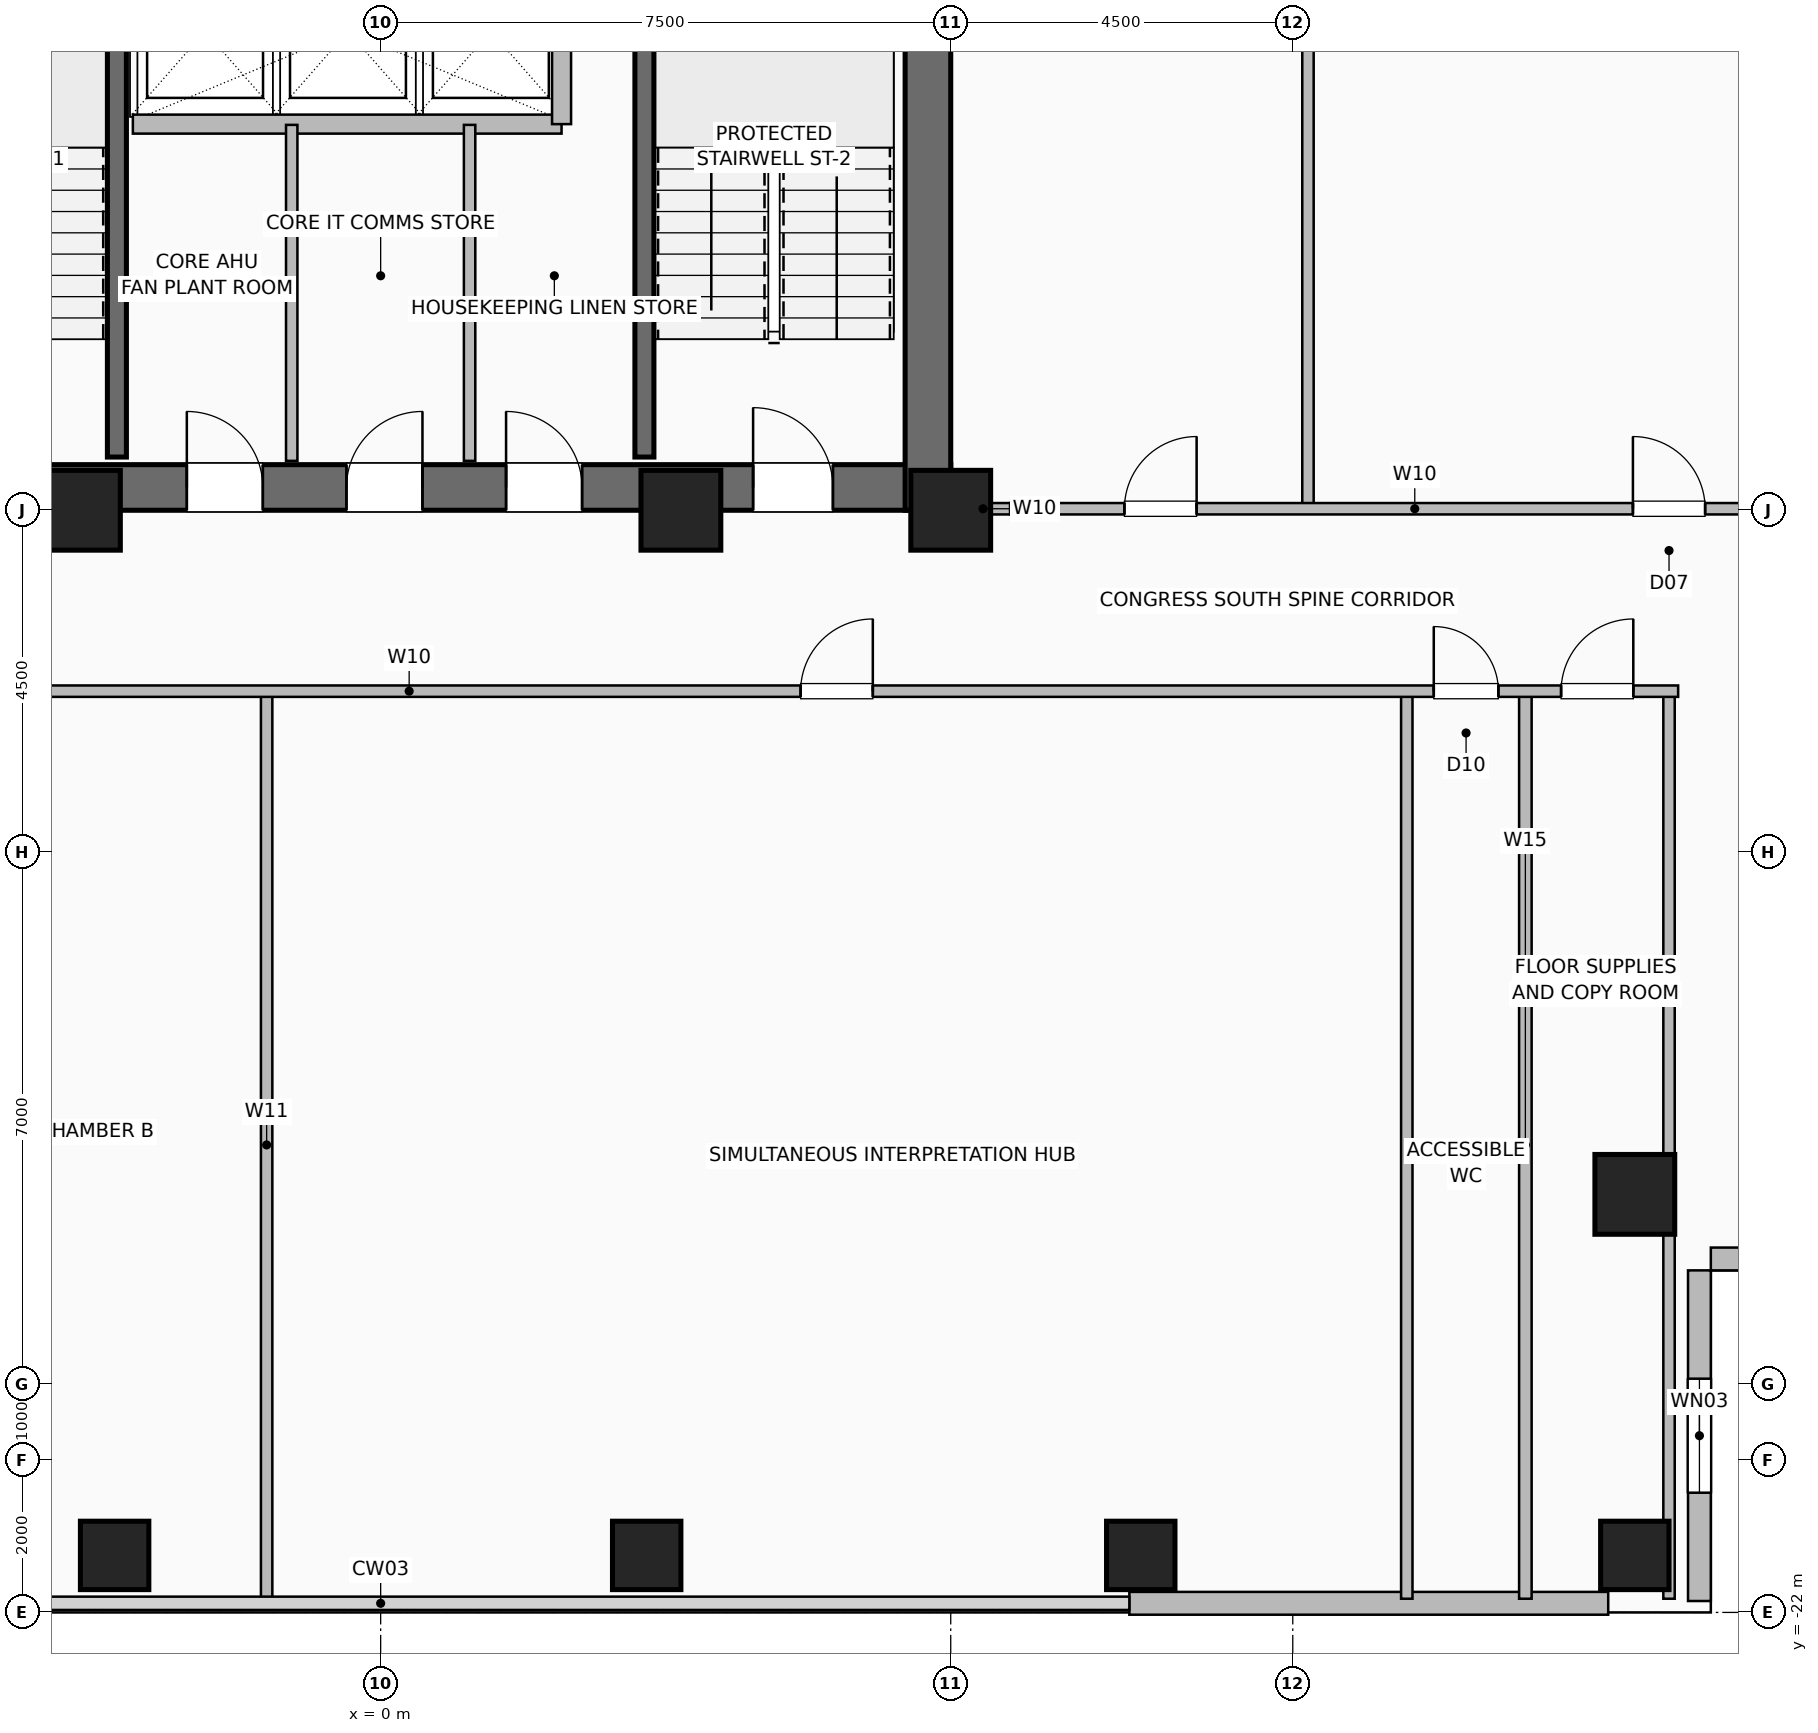
"""IFC4 building model, lengths in metres.
Left out: names, types, materials, properties, quantities, classifications, styles, units other than length and angle.
Written with IfcOpenShell. Run it as: python <this file> out.ifc"""

import sys

from ifc_helpers import new_model, si_unit, direction, frame, frame_2d, origin, origin_2d, place, context, subcontext, project, spatial, rectangle, hollow_rectangle, extrude, element, fill, save


model = new_model("IFC4")
c1 = context("Model", 3, precision=1e-05, world=origin(), true_north=direction((0.0, 1.0)))
c2 = subcontext(c1, "Body", "Model", "MODEL_VIEW")
j1 = project(units=[si_unit("LENGTHUNIT", "METRE"), si_unit("PLANEANGLEUNIT", "RADIAN")], contexts=[c1])
p1 = place(None, origin())
s1 = spatial("IfcSite", under=j1, at=p1, CompositionType="ELEMENT")
p2 = place(p1, origin())
s2 = spatial("IfcBuilding", under=s1, at=p2, CompositionType="ELEMENT")
p3 = place(p2, frame((0.0, 0.0, 101.2)))
s3 = spatial("IfcBuildingStorey", under=s2, at=p3, CompositionType="ELEMENT", Elevation=101.2)
for number, where, z_axis, x_axis in (
    (1, (-3.95, -7.5, 0.0), (0.0, 0.0, 1.0), (1.0, 0.0, 0.0)),
    (2, (3.95, -7.5, 0.0), (0.0, 0.0, 1.0), (1.0, 0.0, 0.0)),
    (3, (7.5, -7.5, 0.0), (0.0, 0.0, 1.0), (1.0, 0.0, 0.0)),
):
    element("IfcColumn", number, at=place(p3, frame(where, z_axis=z_axis, x_axis=x_axis)), inside=s3, PredefinedType="COLUMN", context=c2, shape_type="SweptSolid", body=[
        extrude(hollow_rectangle(XDim=1.05, YDim=1.05, WallThickness=0.05, at=origin_2d()), origin(), (0.0, 0.0, 1.0), 3.6),
    ])
for number, where, z_axis, x_axis in (
    (4, (-3.5, -21.25, 0.0), (0.0, 0.0, 1.0), (1.0, 0.0, 0.0)),
    (5, (3.5, -21.25, 0.0), (0.0, 0.0, 1.0), (1.0, 0.0, 0.0)),
    (6, (10.0, -21.25, 0.0), (0.0, 0.0, 1.0), (1.0, 0.0, 0.0)),
    (7, (16.5, -21.25, 0.0), (0.0, 0.0, 1.0), (1.0, 0.0, 0.0)),
):
    element("IfcColumn", number, at=place(p3, frame(where, z_axis=z_axis, x_axis=x_axis)), inside=s3, PredefinedType="COLUMN", context=c2, shape_type="SweptSolid", body=[
        extrude(hollow_rectangle(XDim=0.9, YDim=0.9, WallThickness=0.045, at=origin_2d()), origin(), (0.0, 0.0, 1.0), 3.6),
    ])
p4 = place(p3, frame((16.5, -16.5, 0.0), z_axis=(0.0, 0.0, 1.0), x_axis=(1.0, 0.0, 0.0)))
e8 = element("IfcColumn", 8, at=p4, inside=s3, PredefinedType="COLUMN", context=c2, shape_type="SweptSolid", body=[
    extrude(hollow_rectangle(XDim=1.05, YDim=1.05, WallThickness=0.05, at=origin_2d()), origin(), (0.0, 0.0, 1.0), 3.6),
])
p5 = place(p3, frame((9.85, -21.88, 0.0), z_axis=(0.0, 0.0, 1.0), x_axis=(1.0, 0.0, 0.0)))
e9 = element("IfcWall", 9, at=p5, inside=s3, PredefinedType="SOLIDWALL", context=c2, shape_type="SweptSolid", body=[
    extrude(rectangle(XDim=6.3, YDim=0.3, at=frame_2d((3.15, 0.0))), origin(), (0.0, 0.0, 1.0), 3.36),
])
p6 = place(p3, frame((17.35, -21.85, 0.0), z_axis=(0.0, 0.0, 1.0), x_axis=(0.0, 1.0, 0.0)))
e10 = element("IfcWall", 10, at=p6, inside=s3, PredefinedType="SOLIDWALL", context=c2, shape_type="SweptSolid", body=[
    extrude(rectangle(XDim=4.35, YDim=0.3, at=frame_2d((2.175, 0.0))), origin(), (0.0, 0.0, 1.0), 3.36),
])
p7 = place(p6, frame((1.425, 0.0, 0.9)))
e11 = element("IfcOpeningElement", 11, at=p7, cuts=e10, PredefinedType="OPENING", context=c2, shape_type="SweptSolid", body=[
    extrude(rectangle(XDim=1.5, YDim=1.8, at=frame_2d((0.75, 0.9))), frame((0.0, 0.16, 0.0), z_axis=(0.0, -1.0, 0.0), x_axis=(1.0, 0.0, 0.0)), (0.0, 0.0, 1.0), 0.32),
])
p8 = place(p3, frame((21.85, -17.35, 0.0), z_axis=(0.0, 0.0, 1.0), x_axis=(-1.0, 0.0, 0.0)))
e12 = element("IfcWall", 12, at=p8, inside=s3, PredefinedType="SOLIDWALL", context=c2, shape_type="SweptSolid", body=[
    extrude(rectangle(XDim=4.35, YDim=0.3, at=frame_2d((2.175, 0.0))), origin(), (0.0, 0.0, 1.0), 3.36),
])
p9 = place(p3, frame((-7.5, -7.2, 0.0), z_axis=(0.0, 0.0, 1.0), x_axis=(1.0, 0.0, 0.0)))
e13 = element("IfcWall", 13, at=p9, inside=s3, PredefinedType="SHEAR", context=c2, shape_type="SweptSolid", body=[
    extrude(rectangle(XDim=15.0, YDim=0.6, at=frame_2d((7.5, 0.0))), origin(), (0.0, 0.0, 1.0), 3.36),
])
p10 = place(p9, frame((1.55, 0.0, 0.0)))
e14 = element("IfcOpeningElement", 14, at=p10, cuts=e13, PredefinedType="OPENING", context=c2, shape_type="SweptSolid", body=[
    extrude(rectangle(XDim=1.05, YDim=2.08, at=frame_2d((0.525, 1.04))), frame((0.0, 0.31, 0.0), z_axis=(0.0, -1.0, 0.0), x_axis=(1.0, 0.0, 0.0)), (0.0, 0.0, 1.0), 0.62),
])
p11 = place(p9, frame((12.4, 0.0, 0.0)))
e15 = element("IfcOpeningElement", 15, at=p11, cuts=e13, PredefinedType="OPENING", context=c2, shape_type="SweptSolid", body=[
    extrude(rectangle(XDim=1.05, YDim=2.08, at=frame_2d((0.525, 1.04))), frame((0.0, 0.31, 0.0), z_axis=(0.0, -1.0, 0.0), x_axis=(1.0, 0.0, 0.0)), (0.0, 0.0, 1.0), 0.62),
])
p12 = place(p9, frame((4.95, 0.0, 0.0)))
e16 = element("IfcOpeningElement", 16, at=p12, cuts=e13, PredefinedType="OPENING", context=c2, shape_type="SweptSolid", body=[
    extrude(rectangle(XDim=1.0, YDim=2.08, at=frame_2d((0.5, 1.04))), frame((0.0, 0.31, 0.0), z_axis=(0.0, -1.0, 0.0), x_axis=(1.0, 0.0, 0.0)), (0.0, 0.0, 1.0), 0.62),
])
p13 = place(p9, frame((7.05, 0.0, 0.0)))
e17 = element("IfcOpeningElement", 17, at=p13, cuts=e13, PredefinedType="OPENING", context=c2, shape_type="SweptSolid", body=[
    extrude(rectangle(XDim=1.0, YDim=2.08, at=frame_2d((0.5, 1.04))), frame((0.0, 0.31, 0.0), z_axis=(0.0, -1.0, 0.0), x_axis=(1.0, 0.0, 0.0)), (0.0, 0.0, 1.0), 0.62),
])
p14 = place(p9, frame((9.15, 0.0, 0.0)))
e18 = element("IfcOpeningElement", 18, at=p14, cuts=e13, PredefinedType="OPENING", context=c2, shape_type="SweptSolid", body=[
    extrude(rectangle(XDim=1.0, YDim=2.08, at=frame_2d((0.5, 1.04))), frame((0.0, 0.31, 0.0), z_axis=(0.0, -1.0, 0.0), x_axis=(1.0, 0.0, 0.0)), (0.0, 0.0, 1.0), 0.62),
])
p15 = place(p3, frame((7.2, -7.5, 0.0), z_axis=(0.0, 0.0, 1.0), x_axis=(0.0, 1.0, 0.0)))
e19 = element("IfcWall", 19, at=p15, inside=s3, PredefinedType="SHEAR", context=c2, shape_type="SweptSolid", body=[
    extrude(rectangle(XDim=15.0, YDim=0.6, at=frame_2d((7.5, 0.0))), origin(), (0.0, 0.0, 1.0), 3.36),
])
for number, where, z_axis, x_axis in (
    (20, (-3.47, -6.8, 0.0), (0.0, 0.0, 1.0), (0.0, 1.0, 0.0)),
    (21, (3.47, -6.8, 0.0), (0.0, 0.0, 1.0), (0.0, 1.0, 0.0)),
):
    element("IfcWall", number, at=place(p3, frame(where, z_axis=z_axis, x_axis=x_axis)), inside=s3, PredefinedType="SHEAR", context=c2, shape_type="SweptSolid", body=[
        extrude(rectangle(XDim=7.72, YDim=0.25, at=frame_2d((3.86, 0.0))), origin(), (0.0, 0.0, 1.0), 3.36),
    ])
p16 = place(p3, frame((-3.26, -2.42, 0.0), z_axis=(0.0, 0.0, 1.0), x_axis=(1.0, 0.0, 0.0)))
e22 = element("IfcWall", 22, at=p16, inside=s3, PredefinedType="SHEAR", context=c2, shape_type="SweptSolid", body=[
    extrude(rectangle(XDim=5.64, YDim=0.25, at=frame_2d((2.82, 0.0))), origin(), (0.0, 0.0, 1.0), 3.36),
])
p17 = place(p3, frame((2.38, -2.42, 0.0), z_axis=(0.0, 0.0, 1.0), x_axis=(0.0, 1.0, 0.0)))
e23 = element("IfcWall", 23, at=p17, inside=s3, PredefinedType="SHEAR", context=c2, shape_type="SweptSolid", body=[
    extrude(rectangle(XDim=2.44, YDim=0.25, at=frame_2d((1.22, 0.0))), origin(), (0.0, 0.0, 1.0), 3.36),
])
for number, where, z_axis, x_axis in (
    (24, (-1.17, -6.85, 0.0), (0.0, 0.0, 1.0), (0.0, 1.0, 0.0)),
    (25, (1.17, -6.85, 0.0), (0.0, 0.0, 1.0), (0.0, 1.0, 0.0)),
):
    element("IfcWall", number, at=place(p3, frame(where, z_axis=z_axis, x_axis=x_axis)), inside=s3, PredefinedType="PARTITIONING", context=c2, shape_type="SweptSolid", body=[
        extrude(rectangle(XDim=4.42, YDim=0.15, at=frame_2d((2.21, 0.0))), origin(), (0.0, 0.0, 1.0), 3.36),
    ])
p18 = place(p3, frame((15.06, -21.82, 0.0), z_axis=(0.0, 0.0, 1.0), x_axis=(0.0, 1.0, 0.0)))
e26 = element("IfcWall", 26, at=p18, inside=s3, PredefinedType="PLUMBINGWALL", context=c2, shape_type="SweptSolid", body=[
    extrude(rectangle(XDim=11.94, YDim=0.165, at=frame_2d((5.97, 0.0))), origin(), (0.0, 0.0, 1.0), 3.36),
])
for number, where, z_axis, x_axis in (
    (27, (-1.5, -21.82, 0.0), (0.0, 0.0, 1.0), (0.0, 1.0, 0.0)),
    (28, (13.5, -21.82, 0.0), (0.0, 0.0, 1.0), (0.0, 1.0, 0.0)),
    (29, (16.95, -21.82, 0.0), (0.0, 0.0, 1.0), (0.0, 1.0, 0.0)),
):
    element("IfcWall", number, at=place(p3, frame(where, z_axis=z_axis, x_axis=x_axis)), inside=s3, PredefinedType="PARTITIONING", context=c2, shape_type="SweptSolid", body=[
        extrude(rectangle(XDim=11.94, YDim=0.15, at=frame_2d((5.97, 0.0))), origin(), (0.0, 0.0, 1.0), 3.36),
    ])
p19 = place(p3, frame((-17.07, -9.88, 0.0), z_axis=(0.0, 0.0, 1.0), x_axis=(1.0, 0.0, 0.0)))
e30 = element("IfcWall", 30, at=p19, inside=s3, PredefinedType="PARTITIONING", context=c2, shape_type="SweptSolid", body=[
    extrude(rectangle(XDim=34.14, YDim=0.15, at=frame_2d((17.07, 0.0))), origin(), (0.0, 0.0, 1.0), 3.36),
])
p20 = place(p19, frame((3.195, 0.0, 0.0)))
e31 = element("IfcOpeningElement", 31, at=p20, cuts=e30, PredefinedType="OPENING", context=c2, shape_type="SweptSolid", body=[
    extrude(rectangle(XDim=1.8, YDim=2.08, at=frame_2d((0.9, 1.04))), frame((0.0, 0.085, 0.0), z_axis=(0.0, -1.0, 0.0), x_axis=(1.0, 0.0, 0.0)), (0.0, 0.0, 1.0), 0.17),
])
p21 = place(p19, frame((11.345, 0.0, 0.0)))
e32 = element("IfcOpeningElement", 32, at=p21, cuts=e30, PredefinedType="OPENING", context=c2, shape_type="SweptSolid", body=[
    extrude(rectangle(XDim=0.95, YDim=2.06, at=frame_2d((0.475, 1.03))), frame((0.0, 0.085, 0.0), z_axis=(0.0, -1.0, 0.0), x_axis=(1.0, 0.0, 0.0)), (0.0, 0.0, 1.0), 0.17),
])
p22 = place(p19, frame((22.595, 0.0, 0.0)))
e33 = element("IfcOpeningElement", 33, at=p22, cuts=e30, PredefinedType="OPENING", context=c2, shape_type="SweptSolid", body=[
    extrude(rectangle(XDim=0.95, YDim=2.06, at=frame_2d((0.475, 1.03))), frame((0.0, 0.085, 0.0), z_axis=(0.0, -1.0, 0.0), x_axis=(1.0, 0.0, 0.0)), (0.0, 0.0, 1.0), 0.17),
])
p23 = place(p19, frame((30.925, 0.0, 0.0)))
e34 = element("IfcOpeningElement", 34, at=p23, cuts=e30, PredefinedType="OPENING", context=c2, shape_type="SweptSolid", body=[
    extrude(rectangle(XDim=0.85, YDim=2.05, at=frame_2d((0.425, 1.025))), frame((0.0, 0.085, 0.0), z_axis=(0.0, -1.0, 0.0), x_axis=(1.0, 0.0, 0.0)), (0.0, 0.0, 1.0), 0.17),
])
p24 = place(p19, frame((32.6, 0.0, 0.0)))
e35 = element("IfcOpeningElement", 35, at=p24, cuts=e30, PredefinedType="OPENING", context=c2, shape_type="SweptSolid", body=[
    extrude(rectangle(XDim=0.95, YDim=2.06, at=frame_2d((0.475, 1.03))), frame((0.0, 0.085, 0.0), z_axis=(0.0, -1.0, 0.0), x_axis=(1.0, 0.0, 0.0)), (0.0, 0.0, 1.0), 0.17),
])
p25 = place(p3, frame((7.45, -7.48, 0.0), z_axis=(0.0, 0.0, 1.0), x_axis=(1.0, 0.0, 0.0)))
e36 = element("IfcWall", 36, at=p25, inside=s3, PredefinedType="PARTITIONING", context=c2, shape_type="SweptSolid", body=[
    extrude(rectangle(XDim=0.95, YDim=0.15, at=frame_2d((0.475, 0.0))), origin(), (0.0, 0.0, 1.0), 3.36),
])
p26 = place(p3, frame((12.2, -7.48, 0.0), z_axis=(0.0, 0.0, 1.0), x_axis=(0.0, 1.0, 0.0)))
e37 = element("IfcWall", 37, at=p26, inside=s3, PredefinedType="PARTITIONING", context=c2, shape_type="SweptSolid", body=[
    extrude(rectangle(XDim=14.88, YDim=0.15, at=frame_2d((7.44, 0.0))), origin(), (0.0, 0.0, 1.0), 3.36),
])
p27 = place(p3, frame((8.28, -7.48, 0.0), z_axis=(0.0, 0.0, 1.0), x_axis=(1.0, 0.0, 0.0)))
e38 = element("IfcWall", 38, at=p27, inside=s3, PredefinedType="PARTITIONING", context=c2, shape_type="SweptSolid", body=[
    extrude(rectangle(XDim=13.54, YDim=0.15, at=frame_2d((6.77, 0.0))), origin(), (0.0, 0.0, 1.0), 3.36),
])
p28 = place(p27, frame((1.505, 0.0, 0.0)))
e39 = element("IfcOpeningElement", 39, at=p28, cuts=e38, PredefinedType="OPENING", context=c2, shape_type="SweptSolid", body=[
    extrude(rectangle(XDim=0.95, YDim=2.06, at=frame_2d((0.475, 1.03))), frame((0.0, 0.085, 0.0), z_axis=(0.0, -1.0, 0.0), x_axis=(1.0, 0.0, 0.0)), (0.0, 0.0, 1.0), 0.17),
])
p29 = place(p27, frame((8.195, 0.0, 0.0)))
e40 = element("IfcOpeningElement", 40, at=p29, cuts=e38, PredefinedType="OPENING", context=c2, shape_type="SweptSolid", body=[
    extrude(rectangle(XDim=0.95, YDim=2.06, at=frame_2d((0.475, 1.03))), frame((0.0, 0.085, 0.0), z_axis=(0.0, -1.0, 0.0), x_axis=(1.0, 0.0, 0.0)), (0.0, 0.0, 1.0), 0.17),
])
p30 = place(p7, origin())
e41 = element("IfcWindow", 41, at=p30, inside=s3, PartitioningType="SINGLE_PANEL", PredefinedType="WINDOW", context=c2, shape_type="SweptSolid", body=[
    extrude(rectangle(XDim=1.5, YDim=1.8, at=frame_2d((0.75, 0.9))), frame((0.0, 0.03, 0.0), z_axis=(0.0, -1.0, 0.0), x_axis=(1.0, 0.0, 0.0)), (0.0, 0.0, 1.0), 0.06),
])
fill(e11, e41)
p31 = place(p11, origin())
e42 = element("IfcDoor", 42, at=p31, inside=s3, OperationType="SINGLE_SWING_LEFT", PredefinedType="DOOR", context=c2, shape_type="SweptSolid", body=[
    extrude(rectangle(XDim=1.05, YDim=2.08, at=frame_2d((0.525, 1.04))), frame((0.0, 0.025, 0.0), z_axis=(0.0, -1.0, 0.0), x_axis=(1.0, 0.0, 0.0)), (0.0, 0.0, 1.0), 0.05),
])
fill(e15, e42)
p32 = place(p12, origin())
e43 = element("IfcDoor", 43, at=p32, inside=s3, OperationType="SINGLE_SWING_LEFT", PredefinedType="DOOR", context=c2, shape_type="SweptSolid", body=[
    extrude(rectangle(XDim=1.0, YDim=2.08, at=frame_2d((0.5, 1.04))), frame((0.0, 0.025, 0.0), z_axis=(0.0, -1.0, 0.0), x_axis=(1.0, 0.0, 0.0)), (0.0, 0.0, 1.0), 0.05),
])
fill(e16, e43)
p33 = place(p13, origin())
e44 = element("IfcDoor", 44, at=p33, inside=s3, OperationType="SINGLE_SWING_RIGHT", PredefinedType="DOOR", context=c2, shape_type="SweptSolid", body=[
    extrude(rectangle(XDim=1.0, YDim=2.08, at=frame_2d((0.5, 1.04))), frame((0.0, 0.025, 0.0), z_axis=(0.0, -1.0, 0.0), x_axis=(1.0, 0.0, 0.0)), (0.0, 0.0, 1.0), 0.05),
])
fill(e17, e44)
p34 = place(p14, origin())
e45 = element("IfcDoor", 45, at=p34, inside=s3, OperationType="SINGLE_SWING_LEFT", PredefinedType="DOOR", context=c2, shape_type="SweptSolid", body=[
    extrude(rectangle(XDim=1.0, YDim=2.08, at=frame_2d((0.5, 1.04))), frame((0.0, 0.025, 0.0), z_axis=(0.0, -1.0, 0.0), x_axis=(1.0, 0.0, 0.0)), (0.0, 0.0, 1.0), 0.05),
])
fill(e18, e45)
p35 = place(p22, origin())
e46 = element("IfcDoor", 46, at=p35, inside=s3, OperationType="SINGLE_SWING_RIGHT", PredefinedType="DOOR", context=c2, shape_type="SweptSolid", body=[
    extrude(rectangle(XDim=0.95, YDim=2.06, at=frame_2d((0.475, 1.03))), frame((0.0, 0.025, 0.0), z_axis=(0.0, -1.0, 0.0), x_axis=(1.0, 0.0, 0.0)), (0.0, 0.0, 1.0), 0.05),
])
fill(e33, e46)
p36 = place(p23, origin())
e47 = element("IfcDoor", 47, at=p36, inside=s3, OperationType="SINGLE_SWING_LEFT", PredefinedType="DOOR", context=c2, shape_type="SweptSolid", body=[
    extrude(rectangle(XDim=0.85, YDim=2.05, at=frame_2d((0.425, 1.025))), frame((0.0, 0.025, 0.0), z_axis=(0.0, -1.0, 0.0), x_axis=(1.0, 0.0, 0.0)), (0.0, 0.0, 1.0), 0.05),
])
fill(e34, e47)
p37 = place(p24, origin())
e48 = element("IfcDoor", 48, at=p37, inside=s3, OperationType="SINGLE_SWING_RIGHT", PredefinedType="DOOR", context=c2, shape_type="SweptSolid", body=[
    extrude(rectangle(XDim=0.95, YDim=2.06, at=frame_2d((0.475, 1.03))), frame((0.0, 0.025, 0.0), z_axis=(0.0, -1.0, 0.0), x_axis=(1.0, 0.0, 0.0)), (0.0, 0.0, 1.0), 0.05),
])
fill(e35, e48)
p38 = place(p28, origin())
e49 = element("IfcDoor", 49, at=p38, inside=s3, OperationType="SINGLE_SWING_RIGHT", PredefinedType="DOOR", context=c2, shape_type="SweptSolid", body=[
    extrude(rectangle(XDim=0.95, YDim=2.06, at=frame_2d((0.475, 1.03))), frame((0.0, 0.025, 0.0), z_axis=(0.0, -1.0, 0.0), x_axis=(1.0, 0.0, 0.0)), (0.0, 0.0, 1.0), 0.05),
])
fill(e39, e49)
p39 = place(p29, origin())
e50 = element("IfcDoor", 50, at=p39, inside=s3, OperationType="SINGLE_SWING_LEFT", PredefinedType="DOOR", context=c2, shape_type="SweptSolid", body=[
    extrude(rectangle(XDim=0.95, YDim=2.06, at=frame_2d((0.475, 1.03))), frame((0.0, 0.025, 0.0), z_axis=(0.0, -1.0, 0.0), x_axis=(1.0, 0.0, 0.0)), (0.0, 0.0, 1.0), 0.05),
])
fill(e40, e50)
save(model, sys.argv[1])
